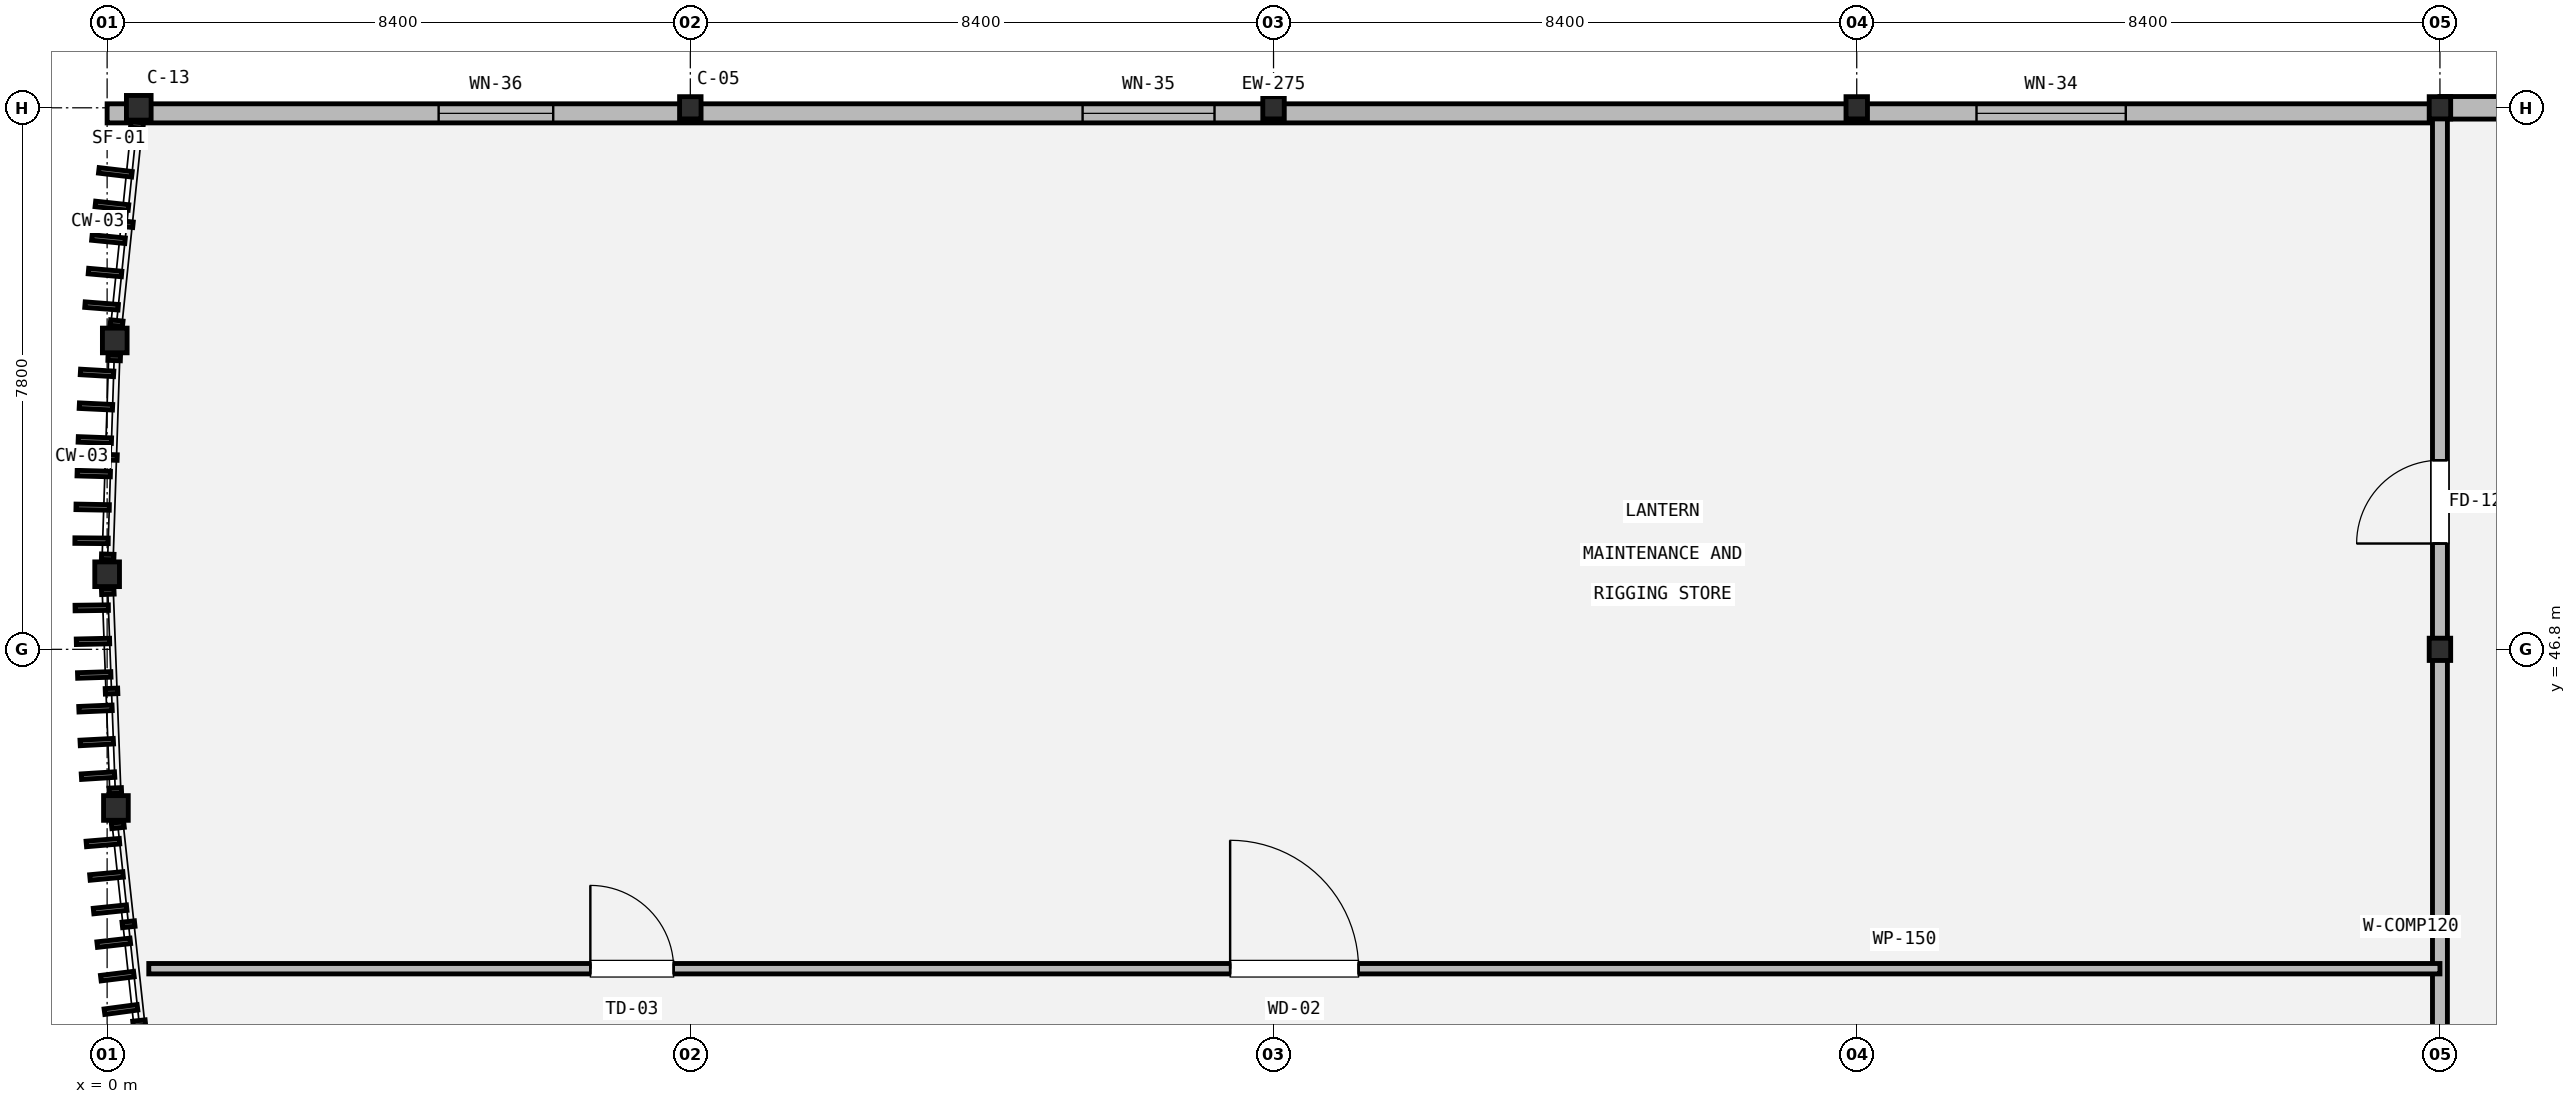
"""IFC4 building model, lengths in metres.
Left out: names, types, materials, properties, quantities, classifications, styles, units other than length and angle.
Written with IfcOpenShell. Run it as: python <this file> out.ifc"""

import sys

from ifc_helpers import new_model, si_unit, direction, frame, frame_2d, origin, origin_2d, place, context, subcontext, project, spatial, rectangle, hollow_circle, i_section, extrude, element, fill, save


model = new_model("IFC4")
c1 = context("Model", 3, precision=1e-05, world=origin(), true_north=direction((0.0, 1.0)))
c2 = subcontext(c1, "Body", "Model", "MODEL_VIEW")
j1 = project(units=[si_unit("LENGTHUNIT", "METRE"), si_unit("PLANEANGLEUNIT", "RADIAN")], contexts=[c1])
p1 = place(None, origin())
s1 = spatial("IfcSite", under=j1, at=p1, CompositionType="ELEMENT")
p2 = place(p1, origin())
s2 = spatial("IfcBuilding", under=s1, at=p2, CompositionType="ELEMENT")
p3 = place(p2, frame((0.0, 0.0, 23.4)))
s3 = spatial("IfcBuildingStorey", under=s2, at=p3, CompositionType="ELEMENT", Elevation=23.4)
for number, where, z_axis, x_axis in (
    (1, (8.4, 54.6, 0.0), (0.0, 0.0, 1.0), (1.0, 0.0, 0.0)),
    (2, (16.8, 54.6, 0.0), (0.0, 0.0, 1.0), (1.0, 0.0, 0.0)),
    (3, (25.2, 54.6, 0.0), (0.0, 0.0, 1.0), (1.0, 0.0, 0.0)),
    (4, (33.6, 46.8, 0.0), (0.0, 0.0, 1.0), (1.0, 0.0, 0.0)),
    (5, (33.6, 54.6, 0.0), (0.0, 0.0, 1.0), (1.0, 0.0, 0.0)),
):
    element("IfcColumn", number, at=place(p3, frame(where, z_axis=z_axis, x_axis=x_axis)), inside=s3, PredefinedType="COLUMN", context=c2, shape_type="SweptSolid", body=[
        extrude(i_section(OverallWidth=0.309, OverallDepth=0.321, WebThickness=0.014, FlangeThickness=0.022, FilletRadius=0.015, at=origin_2d()), origin(), (0.0, 0.0, 1.0), 4.2),
    ])
for number, where, z_axis, x_axis in (
    (6, (0.456, 54.6, 0.0), (0.0, 0.0, 1.0), (1.0, 0.0, 0.0)),
    (7, (0.11, 51.249, 0.0), (0.0, 0.0, 1.0), (1.0, 0.0, 0.0)),
    (8, (0.0, 47.882, 0.0), (0.0, 0.0, 1.0), (1.0, 0.0, 0.0)),
    (9, (0.127, 44.515, 0.0), (0.0, 0.0, 1.0), (1.0, 0.0, 0.0)),
):
    element("IfcColumn", number, at=place(p3, frame(where, z_axis=z_axis, x_axis=x_axis)), inside=s3, PredefinedType="COLUMN", context=c2, shape_type="SweptSolid", body=[
        extrude(hollow_circle(Radius=0.178, WallThickness=0.016, at=origin_2d()), origin(), (0.0, 0.0, 1.0), 4.2),
    ])
p4 = place(p3, frame((33.6, 54.6, 0.0), z_axis=(0.0, 0.0, 1.0), x_axis=(1.0, 0.0, 0.0)))
e10 = element("IfcWall", 10, at=p4, inside=s3, PredefinedType="STANDARD", context=c2, shape_type="SweptSolid", body=[
    extrude(rectangle(XDim=8.4, YDim=0.325, at=frame_2d((4.2, 0.0))), origin(), (0.0, 0.0, 1.0), 3.408),
])
p5 = place(p3, frame((0.0, 54.52, 0.0), z_axis=(0.0, 0.0, 1.0), x_axis=(1.0, 0.0, 0.0)))
e11 = element("IfcWall", 11, at=p5, inside=s3, PredefinedType="STANDARD", context=c2, shape_type="SweptSolid", body=[
    extrude(rectangle(XDim=33.6, YDim=0.275, at=frame_2d((16.8, 0.0))), origin(), (0.0, 0.0, 1.0), 3.408),
])
p6 = place(p5, frame((4.775, 0.0, 0.9)))
e12 = element("IfcOpeningElement", 12, at=p6, cuts=e11, PredefinedType="OPENING", context=c2, shape_type="SweptSolid", body=[
    extrude(rectangle(XDim=1.65, YDim=1.65, at=frame_2d((0.825, 0.825))), frame((0.0, 0.147, 0.0), z_axis=(0.0, -1.0, 0.0), x_axis=(1.0, 0.0, 0.0)), (0.0, 0.0, 1.0), 0.295),
])
p7 = place(p5, frame((14.05, 0.0, 0.9)))
e13 = element("IfcOpeningElement", 13, at=p7, cuts=e11, PredefinedType="OPENING", context=c2, shape_type="SweptSolid", body=[
    extrude(rectangle(XDim=1.9, YDim=1.65, at=frame_2d((0.95, 0.825))), frame((0.0, 0.147, 0.0), z_axis=(0.0, -1.0, 0.0), x_axis=(1.0, 0.0, 0.0)), (0.0, 0.0, 1.0), 0.295),
])
p8 = place(p5, frame((26.925, 0.0, 0.9)))
e14 = element("IfcOpeningElement", 14, at=p8, cuts=e11, PredefinedType="OPENING", context=c2, shape_type="SweptSolid", body=[
    extrude(rectangle(XDim=2.15, YDim=1.65, at=frame_2d((1.075, 0.825))), frame((0.0, 0.147, 0.0), z_axis=(0.0, -1.0, 0.0), x_axis=(1.0, 0.0, 0.0)), (0.0, 0.0, 1.0), 0.295),
])
p9 = place(p3, frame((33.6, 34.6, 0.0), z_axis=(0.0, 0.0, 1.0), x_axis=(0.0, 1.0, 0.0)))
e15 = element("IfcWall", 15, at=p9, inside=s3, PredefinedType="STANDARD", context=c2, shape_type="SweptSolid", body=[
    extrude(rectangle(XDim=20.0, YDim=0.215, at=frame_2d((10.0, 0.0))), origin(), (0.0, 0.0, 1.0), 3.177),
])
p10 = place(p9, frame((1.504, 0.0, 0.0)))
e16 = element("IfcOpeningElement", 16, at=p10, cuts=e15, PredefinedType="OPENING", context=c2, shape_type="SweptSolid", body=[
    extrude(rectangle(XDim=1.2, YDim=2.15, at=frame_2d((0.6, 1.075))), frame((0.0, 0.117, 0.0), z_axis=(0.0, -1.0, 0.0), x_axis=(1.0, 0.0, 0.0)), (0.0, 0.0, 1.0), 0.235),
])
p11 = place(p9, frame((13.724, 0.0, 0.0)))
e17 = element("IfcOpeningElement", 17, at=p11, cuts=e15, PredefinedType="OPENING", context=c2, shape_type="SweptSolid", body=[
    extrude(rectangle(XDim=1.2, YDim=2.15, at=frame_2d((0.6, 1.075))), frame((0.0, 0.117, 0.0), z_axis=(0.0, -1.0, 0.0), x_axis=(1.0, 0.0, 0.0)), (0.0, 0.0, 1.0), 0.235),
])
p12 = place(p3, frame((0.6, 42.2, 0.0), z_axis=(0.0, 0.0, 1.0), x_axis=(1.0, 0.0, 0.0)))
e18 = element("IfcWall", 18, at=p12, inside=s3, PredefinedType="PARTITIONING", context=c2, shape_type="SweptSolid", body=[
    extrude(rectangle(XDim=33.0, YDim=0.15, at=frame_2d((16.5, 0.0))), origin(), (0.0, 0.0, 1.0), 3.408),
])
p13 = place(p12, frame((15.575, 0.0, 0.0)))
e19 = element("IfcOpeningElement", 19, at=p13, cuts=e18, PredefinedType="OPENING", context=c2, shape_type="SweptSolid", body=[
    extrude(rectangle(XDim=1.85, YDim=2.4, at=frame_2d((0.925, 1.2))), frame((0.0, 0.085, 0.0), z_axis=(0.0, -1.0, 0.0), x_axis=(1.0, 0.0, 0.0)), (0.0, 0.0, 1.0), 0.17),
])
p14 = place(p12, frame((6.36, 0.0, 0.0)))
e20 = element("IfcOpeningElement", 20, at=p14, cuts=e18, PredefinedType="OPENING", context=c2, shape_type="SweptSolid", body=[
    extrude(rectangle(XDim=1.2, YDim=1.1, at=frame_2d((0.6, 0.55))), frame((0.0, 0.085, 0.0), z_axis=(0.0, -1.0, 0.0), x_axis=(1.0, 0.0, 0.0)), (0.0, 0.0, 1.0), 0.17),
])
p15 = place(p6, origin())
e21 = element("IfcWindow", 21, at=p15, inside=s3, PartitioningType="SINGLE_PANEL", PredefinedType="WINDOW", context=c2, shape_type="SweptSolid", body=[
    extrude(rectangle(XDim=1.65, YDim=1.65, at=frame_2d((0.825, 0.825))), frame((0.0, 0.03, 0.0), z_axis=(0.0, -1.0, 0.0), x_axis=(1.0, 0.0, 0.0)), (0.0, 0.0, 1.0), 0.06),
])
fill(e12, e21)
p16 = place(p7, origin())
e22 = element("IfcWindow", 22, at=p16, inside=s3, PartitioningType="SINGLE_PANEL", PredefinedType="WINDOW", context=c2, shape_type="SweptSolid", body=[
    extrude(rectangle(XDim=1.9, YDim=1.65, at=frame_2d((0.95, 0.825))), frame((0.0, 0.03, 0.0), z_axis=(0.0, -1.0, 0.0), x_axis=(1.0, 0.0, 0.0)), (0.0, 0.0, 1.0), 0.06),
])
fill(e13, e22)
p17 = place(p8, origin())
e23 = element("IfcWindow", 23, at=p17, inside=s3, PartitioningType="SINGLE_PANEL", PredefinedType="WINDOW", context=c2, shape_type="SweptSolid", body=[
    extrude(rectangle(XDim=2.15, YDim=1.65, at=frame_2d((1.075, 0.825))), frame((0.0, 0.03, 0.0), z_axis=(0.0, -1.0, 0.0), x_axis=(1.0, 0.0, 0.0)), (0.0, 0.0, 1.0), 0.06),
])
fill(e14, e23)
p18 = place(p11, origin())
e24 = element("IfcDoor", 24, at=p18, inside=s3, OperationType="SINGLE_SWING_LEFT", PredefinedType="DOOR", context=c2, shape_type="SweptSolid", body=[
    extrude(rectangle(XDim=1.2, YDim=2.15, at=frame_2d((0.6, 1.075))), frame((0.0, 0.025, 0.0), z_axis=(0.0, -1.0, 0.0), x_axis=(1.0, 0.0, 0.0)), (0.0, 0.0, 1.0), 0.05),
])
fill(e17, e24)
p19 = place(p13, origin())
e25 = element("IfcDoor", 25, at=p19, inside=s3, OperationType="SINGLE_SWING_LEFT", PredefinedType="DOOR", context=c2, shape_type="SweptSolid", body=[
    extrude(rectangle(XDim=1.85, YDim=2.4, at=frame_2d((0.925, 1.2))), frame((0.0, 0.025, 0.0), z_axis=(0.0, -1.0, 0.0), x_axis=(1.0, 0.0, 0.0)), (0.0, 0.0, 1.0), 0.05),
])
fill(e19, e25)
p20 = place(p14, origin())
e26 = element("IfcDoor", 26, at=p20, inside=s3, OperationType="SWING_FIXED_LEFT", PredefinedType="TRAPDOOR", context=c2, shape_type="SweptSolid", body=[
    extrude(rectangle(XDim=1.2, YDim=1.1, at=frame_2d((0.6, 0.55))), frame((0.0, 0.025, 0.0), z_axis=(0.0, -1.0, 0.0), x_axis=(1.0, 0.0, 0.0)), (0.0, 0.0, 1.0), 0.05),
])
fill(e20, e26)
save(model, sys.argv[1])
